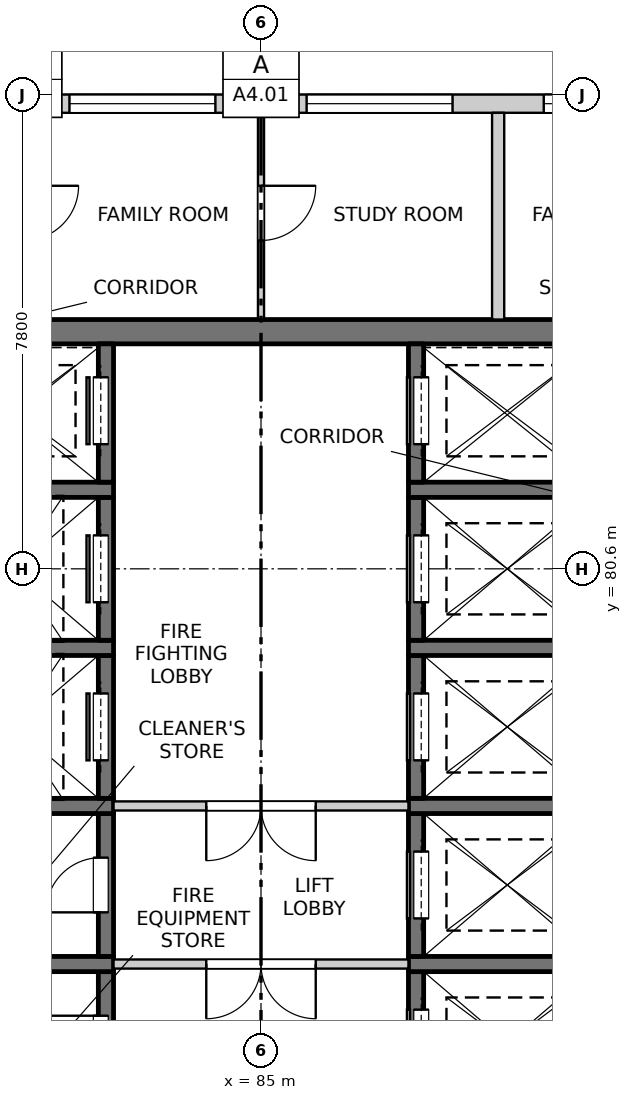
"""IFC4 building model, lengths in metres.
Left out: names, types, materials, properties, quantities, classifications, styles, units other than length and angle.
Written with IfcOpenShell. Run it as: python <this file> out.ifc"""

import sys

from ifc_helpers import new_model, si_unit, direction, frame, frame_2d, origin, place, context, subcontext, project, spatial, rectangle, extrude, element, fill, save


model = new_model("IFC4")
c1 = context("Model", 3, precision=1e-05, world=origin(), true_north=direction((0.0, 1.0)))
c2 = subcontext(c1, "Body", "Model", "MODEL_VIEW")
j1 = project(units=[si_unit("LENGTHUNIT", "METRE"), si_unit("PLANEANGLEUNIT", "RADIAN")], contexts=[c1])
p1 = place(None, origin())
s1 = spatial("IfcSite", under=j1, at=p1, CompositionType="ELEMENT")
p2 = place(p1, origin())
s2 = spatial("IfcBuilding", under=s1, at=p2, CompositionType="ELEMENT")
p3 = place(p2, frame((0.0, 0.0, 221.1)))
s3 = spatial("IfcBuildingStorey", under=s2, at=p3, CompositionType="ELEMENT", Elevation=221.1)
p4 = place(p3, frame((75.45, 84.5, -0.25), z_axis=(0.0, 0.0, 1.0), x_axis=(1.0, 0.0, 0.0)))
e1 = element("IfcWall", 1, at=p4, inside=s3, PredefinedType="SOLIDWALL", context=c2, shape_type="SweptSolid", body=[
    extrude(rectangle(XDim=19.1, YDim=0.4, at=frame_2d((9.55, 0.0))), origin(), (0.0, 0.0, 1.0), 3.4),
])
p5 = place(p3, frame((82.45, 71.625, -0.25), z_axis=(0.0, 0.0, 1.0), x_axis=(0.0, 1.0, 0.0)))
e2 = element("IfcWall", 2, at=p5, inside=s3, PredefinedType="SOLIDWALL", context=c2, shape_type="SweptSolid", body=[
    extrude(rectangle(XDim=2.35, YDim=0.25, at=frame_2d((1.175, 0.0))), origin(), (0.0, 0.0, 1.0), 3.4),
])
p6 = place(p5, frame((0.725, 0.0, 0.25)))
e3 = element("IfcOpeningElement", 3, at=p6, cuts=e2, PredefinedType="OPENING", context=c2, shape_type="SweptSolid", body=[
    extrude(rectangle(XDim=0.9, YDim=2.1, at=frame_2d((0.45, 1.05))), frame((0.0, 0.135, 0.0), z_axis=(0.0, -1.0, 0.0), x_axis=(1.0, 0.0, 0.0)), (0.0, 0.0, 1.0), 0.27),
])
p7 = place(p3, frame((79.575, 74.1, -0.25), z_axis=(0.0, 0.0, 1.0), x_axis=(1.0, 0.0, 0.0)))
e4 = element("IfcWall", 4, at=p7, inside=s3, PredefinedType="SOLIDWALL", context=c2, shape_type="SweptSolid", body=[
    extrude(rectangle(XDim=3.0, YDim=0.25, at=frame_2d((1.5, 0.0))), origin(), (0.0, 0.0, 1.0), 3.4),
])
p8 = place(p3, frame((82.45, 74.225, -0.25), z_axis=(0.0, 0.0, 1.0), x_axis=(0.0, 1.0, 0.0)))
e5 = element("IfcWall", 5, at=p8, inside=s3, PredefinedType="SOLIDWALL", context=c2, shape_type="SweptSolid", body=[
    extrude(rectangle(XDim=2.35, YDim=0.25, at=frame_2d((1.175, 0.0))), origin(), (0.0, 0.0, 1.0), 3.4),
])
p9 = place(p8, frame((0.725, 0.0, 0.25)))
e6 = element("IfcOpeningElement", 6, at=p9, cuts=e5, PredefinedType="OPENING", context=c2, shape_type="SweptSolid", body=[
    extrude(rectangle(XDim=0.9, YDim=2.1, at=frame_2d((0.45, 1.05))), frame((0.0, 0.135, 0.0), z_axis=(0.0, -1.0, 0.0), x_axis=(1.0, 0.0, 0.0)), (0.0, 0.0, 1.0), 0.27),
])
p10 = place(p3, frame((79.575, 76.7, -0.25), z_axis=(0.0, 0.0, 1.0), x_axis=(1.0, 0.0, 0.0)))
e7 = element("IfcWall", 7, at=p10, inside=s3, PredefinedType="SOLIDWALL", context=c2, shape_type="SweptSolid", body=[
    extrude(rectangle(XDim=3.0, YDim=0.25, at=frame_2d((1.5, 0.0))), origin(), (0.0, 0.0, 1.0), 3.4),
])
p11 = place(p3, frame((82.45, 76.825, -0.25), z_axis=(0.0, 0.0, 1.0), x_axis=(0.0, 1.0, 0.0)))
e8 = element("IfcWall", 8, at=p11, inside=s3, PredefinedType="SOLIDWALL", context=c2, shape_type="SweptSolid", body=[
    extrude(rectangle(XDim=2.35, YDim=0.25, at=frame_2d((1.175, 0.0))), origin(), (0.0, 0.0, 1.0), 3.4),
])
p12 = place(p11, frame((0.625, 0.0, 0.25)))
e9 = element("IfcOpeningElement", 9, at=p12, cuts=e8, PredefinedType="OPENING", context=c2, shape_type="SweptSolid", body=[
    extrude(rectangle(XDim=1.1, YDim=2.1, at=frame_2d((0.55, 1.05))), frame((0.0, 0.135, 0.0), z_axis=(0.0, -1.0, 0.0), x_axis=(1.0, 0.0, 0.0)), (0.0, 0.0, 1.0), 0.27),
])
p13 = place(p3, frame((79.575, 79.3, -0.25), z_axis=(0.0, 0.0, 1.0), x_axis=(1.0, 0.0, 0.0)))
e10 = element("IfcWall", 10, at=p13, inside=s3, PredefinedType="SOLIDWALL", context=c2, shape_type="SweptSolid", body=[
    extrude(rectangle(XDim=3.0, YDim=0.25, at=frame_2d((1.5, 0.0))), origin(), (0.0, 0.0, 1.0), 3.4),
])
p14 = place(p3, frame((82.45, 79.425, -0.25), z_axis=(0.0, 0.0, 1.0), x_axis=(0.0, 1.0, 0.0)))
e11 = element("IfcWall", 11, at=p14, inside=s3, PredefinedType="SOLIDWALL", context=c2, shape_type="SweptSolid", body=[
    extrude(rectangle(XDim=2.35, YDim=0.25, at=frame_2d((1.175, 0.0))), origin(), (0.0, 0.0, 1.0), 3.4),
])
p15 = place(p14, frame((0.625, 0.0, 0.25)))
e12 = element("IfcOpeningElement", 12, at=p15, cuts=e11, PredefinedType="OPENING", context=c2, shape_type="SweptSolid", body=[
    extrude(rectangle(XDim=1.1, YDim=2.1, at=frame_2d((0.55, 1.05))), frame((0.0, 0.135, 0.0), z_axis=(0.0, -1.0, 0.0), x_axis=(1.0, 0.0, 0.0)), (0.0, 0.0, 1.0), 0.27),
])
p16 = place(p3, frame((79.575, 81.9, -0.25), z_axis=(0.0, 0.0, 1.0), x_axis=(1.0, 0.0, 0.0)))
e13 = element("IfcWall", 13, at=p16, inside=s3, PredefinedType="SOLIDWALL", context=c2, shape_type="SweptSolid", body=[
    extrude(rectangle(XDim=3.0, YDim=0.25, at=frame_2d((1.5, 0.0))), origin(), (0.0, 0.0, 1.0), 3.4),
])
p17 = place(p3, frame((82.45, 82.025, -0.25), z_axis=(0.0, 0.0, 1.0), x_axis=(0.0, 1.0, 0.0)))
e14 = element("IfcWall", 14, at=p17, inside=s3, PredefinedType="SOLIDWALL", context=c2, shape_type="SweptSolid", body=[
    extrude(rectangle(XDim=2.275, YDim=0.25, at=frame_2d((1.138, 0.0))), origin(), (0.0, 0.0, 1.0), 3.4),
])
p18 = place(p17, frame((0.625, 0.0, 0.25)))
e15 = element("IfcOpeningElement", 15, at=p18, cuts=e14, PredefinedType="OPENING", context=c2, shape_type="SweptSolid", body=[
    extrude(rectangle(XDim=1.1, YDim=2.1, at=frame_2d((0.55, 1.05))), frame((0.0, 0.135, 0.0), z_axis=(0.0, -1.0, 0.0), x_axis=(1.0, 0.0, 0.0)), (0.0, 0.0, 1.0), 0.27),
])
p19 = place(p3, frame((87.55, 71.625, -0.25), z_axis=(0.0, 0.0, 1.0), x_axis=(0.0, 1.0, 0.0)))
e16 = element("IfcWall", 16, at=p19, inside=s3, PredefinedType="SOLIDWALL", context=c2, shape_type="SweptSolid", body=[
    extrude(rectangle(XDim=2.35, YDim=0.25, at=frame_2d((1.175, 0.0))), origin(), (0.0, 0.0, 1.0), 3.4),
])
p20 = place(p19, frame((0.625, 0.0, 0.25)))
e17 = element("IfcOpeningElement", 17, at=p20, cuts=e16, PredefinedType="OPENING", context=c2, shape_type="SweptSolid", body=[
    extrude(rectangle(XDim=1.1, YDim=2.1, at=frame_2d((0.55, 1.05))), frame((0.0, 0.135, 0.0), z_axis=(0.0, -1.0, 0.0), x_axis=(1.0, 0.0, 0.0)), (0.0, 0.0, 1.0), 0.27),
])
p21 = place(p3, frame((87.425, 74.1, -0.25), z_axis=(0.0, 0.0, 1.0), x_axis=(1.0, 0.0, 0.0)))
e18 = element("IfcWall", 18, at=p21, inside=s3, PredefinedType="SOLIDWALL", context=c2, shape_type="SweptSolid", body=[
    extrude(rectangle(XDim=3.0, YDim=0.25, at=frame_2d((1.5, 0.0))), origin(), (0.0, 0.0, 1.0), 3.4),
])
p22 = place(p3, frame((87.55, 74.225, -0.25), z_axis=(0.0, 0.0, 1.0), x_axis=(0.0, 1.0, 0.0)))
e19 = element("IfcWall", 19, at=p22, inside=s3, PredefinedType="SOLIDWALL", context=c2, shape_type="SweptSolid", body=[
    extrude(rectangle(XDim=2.35, YDim=0.25, at=frame_2d((1.175, 0.0))), origin(), (0.0, 0.0, 1.0), 3.4),
])
p23 = place(p22, frame((0.625, 0.0, 0.25)))
e20 = element("IfcOpeningElement", 20, at=p23, cuts=e19, PredefinedType="OPENING", context=c2, shape_type="SweptSolid", body=[
    extrude(rectangle(XDim=1.1, YDim=2.1, at=frame_2d((0.55, 1.05))), frame((0.0, 0.135, 0.0), z_axis=(0.0, -1.0, 0.0), x_axis=(1.0, 0.0, 0.0)), (0.0, 0.0, 1.0), 0.27),
])
p24 = place(p3, frame((87.425, 76.7, -0.25), z_axis=(0.0, 0.0, 1.0), x_axis=(1.0, 0.0, 0.0)))
e21 = element("IfcWall", 21, at=p24, inside=s3, PredefinedType="SOLIDWALL", context=c2, shape_type="SweptSolid", body=[
    extrude(rectangle(XDim=3.0, YDim=0.25, at=frame_2d((1.5, 0.0))), origin(), (0.0, 0.0, 1.0), 3.4),
])
p25 = place(p3, frame((87.55, 76.825, -0.25), z_axis=(0.0, 0.0, 1.0), x_axis=(0.0, 1.0, 0.0)))
e22 = element("IfcWall", 22, at=p25, inside=s3, PredefinedType="SOLIDWALL", context=c2, shape_type="SweptSolid", body=[
    extrude(rectangle(XDim=2.35, YDim=0.25, at=frame_2d((1.175, 0.0))), origin(), (0.0, 0.0, 1.0), 3.4),
])
p26 = place(p25, frame((0.625, 0.0, 0.25)))
e23 = element("IfcOpeningElement", 23, at=p26, cuts=e22, PredefinedType="OPENING", context=c2, shape_type="SweptSolid", body=[
    extrude(rectangle(XDim=1.1, YDim=2.1, at=frame_2d((0.55, 1.05))), frame((0.0, 0.135, 0.0), z_axis=(0.0, -1.0, 0.0), x_axis=(1.0, 0.0, 0.0)), (0.0, 0.0, 1.0), 0.27),
])
p27 = place(p3, frame((87.425, 79.3, -0.25), z_axis=(0.0, 0.0, 1.0), x_axis=(1.0, 0.0, 0.0)))
e24 = element("IfcWall", 24, at=p27, inside=s3, PredefinedType="SOLIDWALL", context=c2, shape_type="SweptSolid", body=[
    extrude(rectangle(XDim=3.0, YDim=0.25, at=frame_2d((1.5, 0.0))), origin(), (0.0, 0.0, 1.0), 3.4),
])
p28 = place(p3, frame((87.55, 79.425, -0.25), z_axis=(0.0, 0.0, 1.0), x_axis=(0.0, 1.0, 0.0)))
e25 = element("IfcWall", 25, at=p28, inside=s3, PredefinedType="SOLIDWALL", context=c2, shape_type="SweptSolid", body=[
    extrude(rectangle(XDim=2.35, YDim=0.25, at=frame_2d((1.175, 0.0))), origin(), (0.0, 0.0, 1.0), 3.4),
])
p29 = place(p28, frame((0.625, 0.0, 0.25)))
e26 = element("IfcOpeningElement", 26, at=p29, cuts=e25, PredefinedType="OPENING", context=c2, shape_type="SweptSolid", body=[
    extrude(rectangle(XDim=1.1, YDim=2.1, at=frame_2d((0.55, 1.05))), frame((0.0, 0.135, 0.0), z_axis=(0.0, -1.0, 0.0), x_axis=(1.0, 0.0, 0.0)), (0.0, 0.0, 1.0), 0.27),
])
p30 = place(p3, frame((87.425, 81.9, -0.25), z_axis=(0.0, 0.0, 1.0), x_axis=(1.0, 0.0, 0.0)))
e27 = element("IfcWall", 27, at=p30, inside=s3, PredefinedType="SOLIDWALL", context=c2, shape_type="SweptSolid", body=[
    extrude(rectangle(XDim=3.0, YDim=0.25, at=frame_2d((1.5, 0.0))), origin(), (0.0, 0.0, 1.0), 3.4),
])
p31 = place(p3, frame((87.55, 82.025, -0.25), z_axis=(0.0, 0.0, 1.0), x_axis=(0.0, 1.0, 0.0)))
e28 = element("IfcWall", 28, at=p31, inside=s3, PredefinedType="SOLIDWALL", context=c2, shape_type="SweptSolid", body=[
    extrude(rectangle(XDim=2.275, YDim=0.25, at=frame_2d((1.138, 0.0))), origin(), (0.0, 0.0, 1.0), 3.4),
])
p32 = place(p31, frame((0.625, 0.0, 0.25)))
e29 = element("IfcOpeningElement", 29, at=p32, cuts=e28, PredefinedType="OPENING", context=c2, shape_type="SweptSolid", body=[
    extrude(rectangle(XDim=1.1, YDim=2.1, at=frame_2d((0.55, 1.05))), frame((0.0, 0.135, 0.0), z_axis=(0.0, -1.0, 0.0), x_axis=(1.0, 0.0, 0.0)), (0.0, 0.0, 1.0), 0.27),
])
p33 = place(p3, frame((73.7, 88.25, 0.0), z_axis=(0.0, 0.0, 1.0), x_axis=(1.0, 0.0, 0.0)))
e30 = element("IfcWall", 30, at=p33, inside=s3, PredefinedType="SOLIDWALL", context=c2, shape_type="SweptSolid", body=[
    extrude(rectangle(XDim=22.6, YDim=0.3, at=frame_2d((11.3, 0.0))), origin(), (0.0, 0.0, 1.0), 2.7),
])
p34 = place(p33, frame((0.35, 0.0, 0.9)))
e31 = element("IfcOpeningElement", 31, at=p34, cuts=e30, PredefinedType="OPENING", context=c2, shape_type="SweptSolid", body=[
    extrude(rectangle(XDim=2.4, YDim=1.8, at=frame_2d((1.2, 0.9))), frame((0.0, 0.16, 0.0), z_axis=(0.0, -1.0, 0.0), x_axis=(1.0, 0.0, 0.0)), (0.0, 0.0, 1.0), 0.32),
])
p35 = place(p33, frame((4.25, 0.0, 0.9)))
e32 = element("IfcOpeningElement", 32, at=p35, cuts=e30, PredefinedType="OPENING", context=c2, shape_type="SweptSolid", body=[
    extrude(rectangle(XDim=2.4, YDim=1.8, at=frame_2d((1.2, 0.9))), frame((0.0, 0.16, 0.0), z_axis=(0.0, -1.0, 0.0), x_axis=(1.0, 0.0, 0.0)), (0.0, 0.0, 1.0), 0.32),
])
p36 = place(p33, frame((8.15, 0.0, 0.9)))
e33 = element("IfcOpeningElement", 33, at=p36, cuts=e30, PredefinedType="OPENING", context=c2, shape_type="SweptSolid", body=[
    extrude(rectangle(XDim=2.4, YDim=1.8, at=frame_2d((1.2, 0.9))), frame((0.0, 0.16, 0.0), z_axis=(0.0, -1.0, 0.0), x_axis=(1.0, 0.0, 0.0)), (0.0, 0.0, 1.0), 0.32),
])
p37 = place(p33, frame((12.05, 0.0, 0.9)))
e34 = element("IfcOpeningElement", 34, at=p37, cuts=e30, PredefinedType="OPENING", context=c2, shape_type="SweptSolid", body=[
    extrude(rectangle(XDim=2.4, YDim=1.8, at=frame_2d((1.2, 0.9))), frame((0.0, 0.16, 0.0), z_axis=(0.0, -1.0, 0.0), x_axis=(1.0, 0.0, 0.0)), (0.0, 0.0, 1.0), 0.32),
])
p38 = place(p33, frame((15.95, 0.0, 0.9)))
e35 = element("IfcOpeningElement", 35, at=p38, cuts=e30, PredefinedType="OPENING", context=c2, shape_type="SweptSolid", body=[
    extrude(rectangle(XDim=2.4, YDim=1.8, at=frame_2d((1.2, 0.9))), frame((0.0, 0.16, 0.0), z_axis=(0.0, -1.0, 0.0), x_axis=(1.0, 0.0, 0.0)), (0.0, 0.0, 1.0), 0.32),
])
p39 = place(p33, frame((19.85, 0.0, 0.9)))
e36 = element("IfcOpeningElement", 36, at=p39, cuts=e30, PredefinedType="OPENING", context=c2, shape_type="SweptSolid", body=[
    extrude(rectangle(XDim=2.4, YDim=1.8, at=frame_2d((1.2, 0.9))), frame((0.0, 0.16, 0.0), z_axis=(0.0, -1.0, 0.0), x_axis=(1.0, 0.0, 0.0)), (0.0, 0.0, 1.0), 0.32),
])
p40 = place(p3, frame((82.575, 74.1, 0.0), z_axis=(0.0, 0.0, 1.0), x_axis=(1.0, 0.0, 0.0)))
e37 = element("IfcWall", 37, at=p40, inside=s3, PredefinedType="PARTITIONING", context=c2, shape_type="SweptSolid", body=[
    extrude(rectangle(XDim=4.85, YDim=0.15, at=frame_2d((2.425, 0.0))), origin(), (0.0, 0.0, 1.0), 3.15),
])
p41 = place(p40, frame((1.525, 0.0, 0.0)))
e38 = element("IfcOpeningElement", 38, at=p41, cuts=e37, PredefinedType="OPENING", context=c2, shape_type="SweptSolid", body=[
    extrude(rectangle(XDim=1.8, YDim=2.1, at=frame_2d((0.9, 1.05))), frame((0.0, 0.085, 0.0), z_axis=(0.0, -1.0, 0.0), x_axis=(1.0, 0.0, 0.0)), (0.0, 0.0, 1.0), 0.17),
])
p42 = place(p3, frame((82.575, 76.7, 0.0), z_axis=(0.0, 0.0, 1.0), x_axis=(1.0, 0.0, 0.0)))
e39 = element("IfcWall", 39, at=p42, inside=s3, PredefinedType="PARTITIONING", context=c2, shape_type="SweptSolid", body=[
    extrude(rectangle(XDim=4.85, YDim=0.15, at=frame_2d((2.425, 0.0))), origin(), (0.0, 0.0, 1.0), 3.15),
])
p43 = place(p42, frame((1.525, 0.0, 0.0)))
e40 = element("IfcOpeningElement", 40, at=p43, cuts=e39, PredefinedType="OPENING", context=c2, shape_type="SweptSolid", body=[
    extrude(rectangle(XDim=1.8, YDim=2.1, at=frame_2d((0.9, 1.05))), frame((0.0, 0.085, 0.0), z_axis=(0.0, -1.0, 0.0), x_axis=(1.0, 0.0, 0.0)), (0.0, 0.0, 1.0), 0.17),
])
p44 = place(p3, frame((85.0, 84.7, 0.0), z_axis=(0.0, 0.0, 1.0), x_axis=(0.0, 1.0, 0.0)))
e41 = element("IfcWall", 41, at=p44, inside=s3, PredefinedType="PARTITIONING", context=c2, shape_type="SweptSolid", body=[
    extrude(rectangle(XDim=3.4, YDim=0.1, at=frame_2d((1.7, 0.0))), origin(), (0.0, 0.0, 1.0), 3.15),
])
p45 = place(p44, frame((1.3, 0.0, 0.0)))
e42 = element("IfcOpeningElement", 42, at=p45, cuts=e41, PredefinedType="OPENING", context=c2, shape_type="SweptSolid", body=[
    extrude(rectangle(XDim=0.9, YDim=2.1, at=frame_2d((0.45, 1.05))), frame((0.0, 0.06, 0.0), z_axis=(0.0, -1.0, 0.0), x_axis=(1.0, 0.0, 0.0)), (0.0, 0.0, 1.0), 0.12),
])
p46 = place(p3, frame((88.9, 84.7, 0.0), z_axis=(0.0, 0.0, 1.0), x_axis=(0.0, 1.0, 0.0)))
e43 = element("IfcWall", 43, at=p46, inside=s3, PredefinedType="PARTITIONING", context=c2, shape_type="SweptSolid", body=[
    extrude(rectangle(XDim=3.4, YDim=0.2, at=frame_2d((1.7, 0.0))), origin(), (0.0, 0.0, 1.0), 3.15),
])
p47 = place(p36, origin())
e44 = element("IfcWindow", 44, at=p47, inside=s3, PartitioningType="DOUBLE_PANEL_VERTICAL", PredefinedType="WINDOW", context=c2, shape_type="SweptSolid", body=[
    extrude(rectangle(XDim=2.4, YDim=1.8, at=frame_2d((1.2, 0.9))), frame((0.0, 0.03, 0.0), z_axis=(0.0, -1.0, 0.0), x_axis=(1.0, 0.0, 0.0)), (0.0, 0.0, 1.0), 0.06),
])
fill(e33, e44)
p48 = place(p37, origin())
e45 = element("IfcWindow", 45, at=p48, inside=s3, PartitioningType="DOUBLE_PANEL_VERTICAL", PredefinedType="WINDOW", context=c2, shape_type="SweptSolid", body=[
    extrude(rectangle(XDim=2.4, YDim=1.8, at=frame_2d((1.2, 0.9))), frame((0.0, 0.03, 0.0), z_axis=(0.0, -1.0, 0.0), x_axis=(1.0, 0.0, 0.0)), (0.0, 0.0, 1.0), 0.06),
])
fill(e34, e45)
p49 = place(p38, origin())
e46 = element("IfcWindow", 46, at=p49, inside=s3, PartitioningType="DOUBLE_PANEL_VERTICAL", PredefinedType="WINDOW", context=c2, shape_type="SweptSolid", body=[
    extrude(rectangle(XDim=2.4, YDim=1.8, at=frame_2d((1.2, 0.9))), frame((0.0, 0.03, 0.0), z_axis=(0.0, -1.0, 0.0), x_axis=(1.0, 0.0, 0.0)), (0.0, 0.0, 1.0), 0.06),
])
fill(e35, e46)
p50 = place(p6, origin())
e47 = element("IfcDoor", 47, at=p50, inside=s3, OperationType="SINGLE_SWING_RIGHT", PredefinedType="DOOR", context=c2, shape_type="SweptSolid", body=[
    extrude(rectangle(XDim=0.9, YDim=2.1, at=frame_2d((0.45, 1.05))), frame((0.0, 0.11, 0.0), z_axis=(0.0, -1.0, 0.0), x_axis=(1.0, 0.0, 0.0)), (0.0, 0.0, 1.0), 0.05),
])
fill(e3, e47)
p51 = place(p20, origin())
e48 = element("IfcDoor", 48, at=p51, inside=s3, OperationType="SLIDING_TO_LEFT", PredefinedType="DOOR", context=c2, shape_type="SweptSolid", body=[
    extrude(rectangle(XDim=1.1, YDim=2.1, at=frame_2d((0.55, 1.05))), frame((0.0, -0.06, 0.0), z_axis=(0.0, -1.0, 0.0), x_axis=(1.0, 0.0, 0.0)), (0.0, 0.0, 1.0), 0.05),
])
fill(e17, e48)
p52 = place(p41, origin())
e49 = element("IfcDoor", 49, at=p52, inside=s3, OperationType="DOUBLE_DOOR_SINGLE_SWING", PredefinedType="DOOR", context=c2, shape_type="SweptSolid", body=[
    extrude(rectangle(XDim=1.8, YDim=2.1, at=frame_2d((0.9, 1.05))), frame((0.0, 0.025, 0.0), z_axis=(0.0, -1.0, 0.0), x_axis=(1.0, 0.0, 0.0)), (0.0, 0.0, 1.0), 0.05),
])
fill(e38, e49)
p53 = place(p9, origin())
e50 = element("IfcDoor", 50, at=p53, inside=s3, OperationType="SINGLE_SWING_LEFT", PredefinedType="DOOR", context=c2, shape_type="SweptSolid", body=[
    extrude(rectangle(XDim=0.9, YDim=2.1, at=frame_2d((0.45, 1.05))), frame((0.0, 0.11, 0.0), z_axis=(0.0, -1.0, 0.0), x_axis=(1.0, 0.0, 0.0)), (0.0, 0.0, 1.0), 0.05),
])
fill(e6, e50)
p54 = place(p23, origin())
e51 = element("IfcDoor", 51, at=p54, inside=s3, OperationType="SLIDING_TO_LEFT", PredefinedType="DOOR", context=c2, shape_type="SweptSolid", body=[
    extrude(rectangle(XDim=1.1, YDim=2.1, at=frame_2d((0.55, 1.05))), frame((0.0, -0.06, 0.0), z_axis=(0.0, -1.0, 0.0), x_axis=(1.0, 0.0, 0.0)), (0.0, 0.0, 1.0), 0.05),
])
fill(e20, e51)
p55 = place(p43, origin())
e52 = element("IfcDoor", 52, at=p55, inside=s3, OperationType="DOUBLE_DOOR_SINGLE_SWING", PredefinedType="DOOR", context=c2, shape_type="SweptSolid", body=[
    extrude(rectangle(XDim=1.8, YDim=2.1, at=frame_2d((0.9, 1.05))), frame((0.0, 0.025, 0.0), z_axis=(0.0, -1.0, 0.0), x_axis=(1.0, 0.0, 0.0)), (0.0, 0.0, 1.0), 0.05),
])
fill(e40, e52)
p56 = place(p12, origin())
e53 = element("IfcDoor", 53, at=p56, inside=s3, OperationType="SLIDING_TO_LEFT", PredefinedType="DOOR", context=c2, shape_type="SweptSolid", body=[
    extrude(rectangle(XDim=1.1, YDim=2.1, at=frame_2d((0.55, 1.05))), frame((0.0, 0.11, 0.0), z_axis=(0.0, -1.0, 0.0), x_axis=(1.0, 0.0, 0.0)), (0.0, 0.0, 1.0), 0.05),
])
fill(e9, e53)
p57 = place(p26, origin())
e54 = element("IfcDoor", 54, at=p57, inside=s3, OperationType="SLIDING_TO_LEFT", PredefinedType="DOOR", context=c2, shape_type="SweptSolid", body=[
    extrude(rectangle(XDim=1.1, YDim=2.1, at=frame_2d((0.55, 1.05))), frame((0.0, -0.06, 0.0), z_axis=(0.0, -1.0, 0.0), x_axis=(1.0, 0.0, 0.0)), (0.0, 0.0, 1.0), 0.05),
])
fill(e23, e54)
p58 = place(p15, origin())
e55 = element("IfcDoor", 55, at=p58, inside=s3, OperationType="SLIDING_TO_LEFT", PredefinedType="DOOR", context=c2, shape_type="SweptSolid", body=[
    extrude(rectangle(XDim=1.1, YDim=2.1, at=frame_2d((0.55, 1.05))), frame((0.0, 0.11, 0.0), z_axis=(0.0, -1.0, 0.0), x_axis=(1.0, 0.0, 0.0)), (0.0, 0.0, 1.0), 0.05),
])
fill(e12, e55)
p59 = place(p29, origin())
e56 = element("IfcDoor", 56, at=p59, inside=s3, OperationType="SLIDING_TO_RIGHT", PredefinedType="DOOR", context=c2, shape_type="SweptSolid", body=[
    extrude(rectangle(XDim=1.1, YDim=2.1, at=frame_2d((0.55, 1.05))), frame((0.0, -0.06, 0.0), z_axis=(0.0, -1.0, 0.0), x_axis=(1.0, 0.0, 0.0)), (0.0, 0.0, 1.0), 0.05),
])
fill(e26, e56)
p60 = place(p18, origin())
e57 = element("IfcDoor", 57, at=p60, inside=s3, OperationType="SLIDING_TO_RIGHT", PredefinedType="DOOR", context=c2, shape_type="SweptSolid", body=[
    extrude(rectangle(XDim=1.1, YDim=2.1, at=frame_2d((0.55, 1.05))), frame((0.0, 0.11, 0.0), z_axis=(0.0, -1.0, 0.0), x_axis=(1.0, 0.0, 0.0)), (0.0, 0.0, 1.0), 0.05),
])
fill(e15, e57)
p61 = place(p32, origin())
e58 = element("IfcDoor", 58, at=p61, inside=s3, OperationType="SLIDING_TO_RIGHT", PredefinedType="DOOR", context=c2, shape_type="SweptSolid", body=[
    extrude(rectangle(XDim=1.1, YDim=2.1, at=frame_2d((0.55, 1.05))), frame((0.0, -0.06, 0.0), z_axis=(0.0, -1.0, 0.0), x_axis=(1.0, 0.0, 0.0)), (0.0, 0.0, 1.0), 0.05),
])
fill(e29, e58)
p62 = place(p45, origin())
e59 = element("IfcDoor", 59, at=p62, inside=s3, OperationType="SINGLE_SWING_LEFT", PredefinedType="DOOR", context=c2, shape_type="SweptSolid", body=[
    extrude(rectangle(XDim=0.9, YDim=2.1, at=frame_2d((0.45, 1.05))), frame((0.0, 0.025, 0.0), z_axis=(0.0, -1.0, 0.0), x_axis=(1.0, 0.0, 0.0)), (0.0, 0.0, 1.0), 0.05),
])
fill(e42, e59)
save(model, sys.argv[1])
